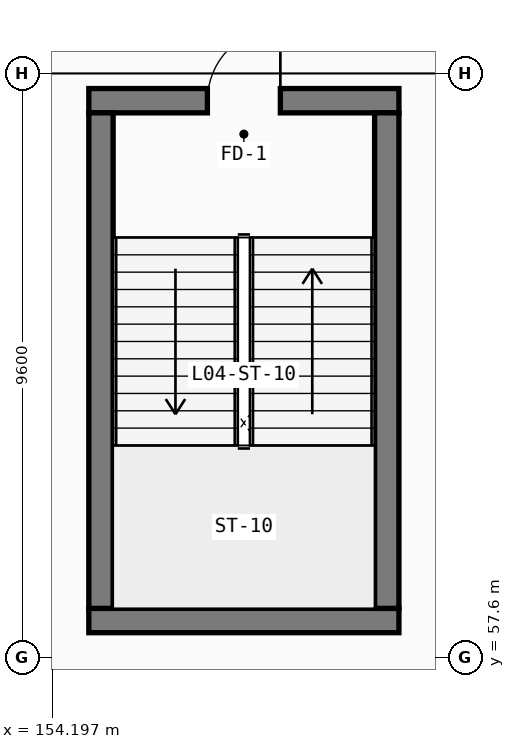
"""IFC4 building model, lengths in metres.
Left out: names, types, materials, properties, quantities, classifications, styles, units other than length and angle.
Written with IfcOpenShell. Run it as: python <this file> out.ifc"""

import sys

from ifc_helpers import new_model, si_unit, direction, frame, frame_2d, origin, place, context, subcontext, project, spatial, rectangle, extrude, element, fill, save


model = new_model("IFC4")
c1 = context("Model", 3, precision=1e-05, world=origin(), true_north=direction((0.0, 1.0)))
c2 = subcontext(c1, "Body", "Model", "MODEL_VIEW")
j1 = project(units=[si_unit("LENGTHUNIT", "METRE"), si_unit("PLANEANGLEUNIT", "RADIAN")], contexts=[c1])
p1 = place(None, origin())
s1 = spatial("IfcSite", under=j1, at=p1, CompositionType="ELEMENT")
p2 = place(p1, origin())
s2 = spatial("IfcBuilding", under=s1, at=p2, CompositionType="ELEMENT")
p3 = place(p2, frame((0.0, 0.0, 18.6)))
s3 = spatial("IfcBuildingStorey", under=s2, at=p3, CompositionType="ELEMENT", Elevation=18.6)
p4 = place(p3, frame((154.8, 58.2, 0.0), z_axis=(0.0, 0.0, 1.0), x_axis=(1.0, 0.0, 0.0)))
e1 = element("IfcWall", 1, at=p4, inside=s3, PredefinedType="SHEAR", context=c2, shape_type="SweptSolid", body=[
    extrude(rectangle(XDim=5.1, YDim=0.4, at=frame_2d((2.55, 0.0))), origin(), (0.0, 0.0, 1.0), 4.24),
])
p5 = place(p3, frame((159.9, 66.75, 0.0), z_axis=(0.0, 0.0, 1.0), x_axis=(-1.0, 0.0, 0.0)))
e2 = element("IfcWall", 2, at=p5, inside=s3, PredefinedType="SHEAR", context=c2, shape_type="SweptSolid", body=[
    extrude(rectangle(XDim=5.1, YDim=0.4, at=frame_2d((2.55, 0.0))), origin(), (0.0, 0.0, 1.0), 4.24),
])
p6 = place(p5, frame((3.15, 0.0, 0.0), z_axis=(0.0, 0.0, 1.0), x_axis=(-1.0, 0.0, 0.0)))
e3 = element("IfcOpeningElement", 3, at=p6, cuts=e2, PredefinedType="OPENING", context=c2, shape_type="SweptSolid", body=[
    extrude(rectangle(XDim=1.2, YDim=2.2, at=frame_2d((0.6, 1.1))), frame((0.0, 0.21, 0.0), z_axis=(0.0, -1.0, 0.0), x_axis=(1.0, 0.0, 0.0)), (0.0, 0.0, 1.0), 0.42),
])
for number, where, z_axis, x_axis in (
    (4, (155.0, 66.55, 0.0), (0.0, 0.0, 1.0), (0.0, -1.0, 0.0)),
    (5, (159.7, 58.4, 0.0), (0.0, 0.0, 1.0), (0.0, 1.0, 0.0)),
):
    element("IfcWall", number, at=place(p3, frame(where, z_axis=z_axis, x_axis=x_axis)), inside=s3, PredefinedType="SHEAR", context=c2, shape_type="SweptSolid", body=[
        extrude(rectangle(XDim=8.15, YDim=0.4, at=frame_2d((4.075, 0.0))), origin(), (0.0, 0.0, 1.0), 4.24),
    ])
p7 = place(p6, origin())
e6 = element("IfcDoor", 6, at=p7, inside=s3, OperationType="SINGLE_SWING_RIGHT", PredefinedType="DOOR", context=c2, shape_type="SweptSolid", body=[
    extrude(rectangle(XDim=1.2, YDim=2.2, at=frame_2d((0.6, 1.1))), frame((0.0, 0.025, 0.0), z_axis=(0.0, -1.0, 0.0), x_axis=(1.0, 0.0, 0.0)), (0.0, 0.0, 1.0), 0.05),
])
fill(e3, e6)
save(model, sys.argv[1])
